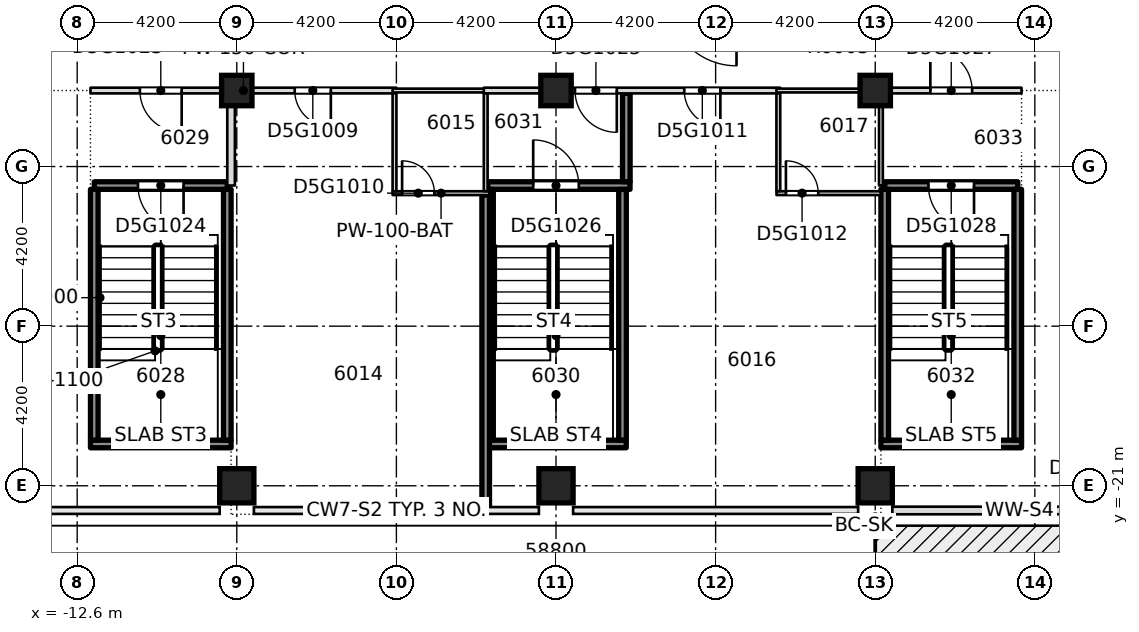
"""IFC4 building model, lengths in metres.
Left out: names, types, materials, properties, quantities, classifications, styles, units other than length and angle.
Written with IfcOpenShell. Run it as: python <this file> out.ifc"""

import sys

from ifc_helpers import new_model, si_unit, direction, frame, frame_2d, origin, origin_2d, place, context, subcontext, project, spatial, rectangle, extrude, element, fill, save


model = new_model("IFC4")
c1 = context("Model", 3, precision=1e-05, world=origin(), true_north=direction((0.0, 1.0)))
c2 = subcontext(c1, "Body", "Model", "MODEL_VIEW")
j1 = project(units=[si_unit("LENGTHUNIT", "METRE"), si_unit("PLANEANGLEUNIT", "RADIAN")], contexts=[c1])
p1 = place(None, origin())
s1 = spatial("IfcSite", under=j1, at=p1, CompositionType="ELEMENT")
p2 = place(p1, origin())
s2 = spatial("IfcBuilding", under=s1, at=p2, CompositionType="ELEMENT")
p3 = place(p2, frame((0.0, 0.0, 230.35)))
s3 = spatial("IfcBuildingStorey", under=s2, at=p3, CompositionType="ELEMENT", Elevation=230.35)
for number, where, z_axis, x_axis in (
    (1, (-8.4, -21.0, -0.4), (0.0, 0.0, 1.0), (1.0, 0.0, 0.0)),
    (2, (0.0, -21.0, -0.4), (0.0, 0.0, 1.0), (1.0, 0.0, 0.0)),
    (3, (8.4, -21.0, -0.4), (0.0, 0.0, 1.0), (1.0, 0.0, 0.0)),
):
    element("IfcColumn", number, at=place(p3, frame(where, z_axis=z_axis, x_axis=x_axis)), inside=s3, PredefinedType="COLUMN", context=c2, shape_type="SweptSolid", body=[
        extrude(rectangle(XDim=0.9, YDim=0.9, at=origin_2d()), origin(), (0.0, 0.0, 1.0), 3.45),
    ])
for number, where, z_axis, x_axis in (
    (4, (-8.4, -10.6, -0.4), (0.0, 0.0, 1.0), (1.0, 0.0, 0.0)),
    (5, (0.0, -10.6, -0.4), (0.0, 0.0, 1.0), (1.0, 0.0, 0.0)),
    (6, (8.4, -10.6, -0.4), (0.0, 0.0, 1.0), (1.0, 0.0, 0.0)),
):
    element("IfcColumn", number, at=place(p3, frame(where, z_axis=z_axis, x_axis=x_axis)), inside=s3, PredefinedType="COLUMN", context=c2, shape_type="SweptSolid", body=[
        extrude(rectangle(XDim=0.8, YDim=0.8, at=origin_2d()), origin(), (0.0, 0.0, 1.0), 3.45),
    ])
p4 = place(p3, frame((-1.848, -19.9, 0.0), z_axis=(0.0, 0.0, 1.0), x_axis=(1.0, 0.0, 0.0)))
e7 = element("IfcWall", 7, at=p4, inside=s3, PredefinedType="SOLIDWALL", context=c2, shape_type="SweptSolid", body=[
    extrude(rectangle(XDim=3.696, YDim=0.2, at=frame_2d((1.848, 0.0))), origin(), (0.0, 0.0, 1.0), 3.05),
])
p5 = place(p3, frame((-4.3, -13.3, 0.0), z_axis=(0.0, 0.0, 1.0), x_axis=(1.0, 0.0, 0.0)))
e8 = element("IfcWall", 8, at=p5, inside=s3, PredefinedType="PARTITIONING", context=c2, shape_type="SweptSolid", body=[
    extrude(rectangle(XDim=2.55, YDim=0.1, at=frame_2d((1.275, 0.0))), origin(), (0.0, 0.0, 1.0), 3.05),
])
p6 = place(p5, frame((0.25, 0.0, 0.0)))
e9 = element("IfcOpeningElement", 9, at=p6, cuts=e8, PredefinedType="OPENING", context=c2, shape_type="SweptSolid", body=[
    extrude(rectangle(XDim=0.85, YDim=2.1, at=frame_2d((0.425, 1.05))), frame((0.0, 0.06, 0.0), z_axis=(0.0, -1.0, 0.0), x_axis=(1.0, 0.0, 0.0)), (0.0, 0.0, 1.0), 0.12),
])
p7 = place(p3, frame((5.802, -13.3, 0.0), z_axis=(0.0, 0.0, 1.0), x_axis=(1.0, 0.0, 0.0)))
e10 = element("IfcWall", 10, at=p7, inside=s3, PredefinedType="PARTITIONING", context=c2, shape_type="SweptSolid", body=[
    extrude(rectangle(XDim=2.748, YDim=0.1, at=frame_2d((1.374, 0.0))), origin(), (0.0, 0.0, 1.0), 3.05),
])
p8 = place(p7, frame((0.248, 0.0, 0.0)))
e11 = element("IfcOpeningElement", 11, at=p8, cuts=e10, PredefinedType="OPENING", context=c2, shape_type="SweptSolid", body=[
    extrude(rectangle(XDim=0.85, YDim=2.1, at=frame_2d((0.425, 1.05))), frame((0.0, 0.06, 0.0), z_axis=(0.0, -1.0, 0.0), x_axis=(1.0, 0.0, 0.0)), (0.0, 0.0, 1.0), 0.12),
])
p9 = place(p3, frame((-12.15, -13.1, 0.0), z_axis=(0.0, 0.0, 1.0), x_axis=(1.0, 0.0, 0.0)))
e12 = element("IfcWall", 12, at=p9, inside=s3, PredefinedType="SOLIDWALL", context=c2, shape_type="SweptSolid", body=[
    extrude(rectangle(XDim=3.5, YDim=0.2, at=frame_2d((1.75, 0.0))), origin(), (0.0, 0.0, 1.0), 3.05),
])
p10 = place(p9, frame((1.15, 0.0, 0.0)))
e13 = element("IfcOpeningElement", 13, at=p10, cuts=e12, PredefinedType="OPENING", context=c2, shape_type="SweptSolid", body=[
    extrude(rectangle(XDim=1.2, YDim=2.1, at=frame_2d((0.6, 1.05))), frame((0.0, 0.11, 0.0), z_axis=(0.0, -1.0, 0.0), x_axis=(1.0, 0.0, 0.0)), (0.0, 0.0, 1.0), 0.22),
])
p11 = place(p3, frame((-1.798, -13.1, 0.0), z_axis=(0.0, 0.0, 1.0), x_axis=(1.0, 0.0, 0.0)))
e14 = element("IfcWall", 14, at=p11, inside=s3, PredefinedType="SOLIDWALL", context=c2, shape_type="SweptSolid", body=[
    extrude(rectangle(XDim=3.746, YDim=0.2, at=frame_2d((1.873, 0.0))), origin(), (0.0, 0.0, 1.0), 3.05),
])
p12 = place(p11, frame((1.198, 0.0, 0.0)))
e15 = element("IfcOpeningElement", 15, at=p12, cuts=e14, PredefinedType="OPENING", context=c2, shape_type="SweptSolid", body=[
    extrude(rectangle(XDim=1.2, YDim=2.1, at=frame_2d((0.6, 1.05))), frame((0.0, 0.11, 0.0), z_axis=(0.0, -1.0, 0.0), x_axis=(1.0, 0.0, 0.0)), (0.0, 0.0, 1.0), 0.22),
])
p13 = place(p3, frame((8.65, -13.1, 0.0), z_axis=(0.0, 0.0, 1.0), x_axis=(1.0, 0.0, 0.0)))
e16 = element("IfcWall", 16, at=p13, inside=s3, PredefinedType="SOLIDWALL", context=c2, shape_type="SweptSolid", body=[
    extrude(rectangle(XDim=3.5, YDim=0.2, at=frame_2d((1.75, 0.0))), origin(), (0.0, 0.0, 1.0), 3.05),
])
p14 = place(p13, frame((1.15, 0.0, 0.0)))
e17 = element("IfcOpeningElement", 17, at=p14, cuts=e16, PredefinedType="OPENING", context=c2, shape_type="SweptSolid", body=[
    extrude(rectangle(XDim=1.2, YDim=2.1, at=frame_2d((0.6, 1.05))), frame((0.0, 0.11, 0.0), z_axis=(0.0, -1.0, 0.0), x_axis=(1.0, 0.0, 0.0)), (0.0, 0.0, 1.0), 0.22),
])
p15 = place(p3, frame((-12.25, -10.6, 0.0), z_axis=(0.0, 0.0, 1.0), x_axis=(1.0, 0.0, 0.0)))
e18 = element("IfcWall", 18, at=p15, inside=s3, PredefinedType="PARTITIONING", context=c2, shape_type="SweptSolid", body=[
    extrude(rectangle(XDim=8.05, YDim=0.15, at=frame_2d((4.025, 0.0))), origin(), (0.0, 0.0, 1.0), 3.05),
])
p16 = place(p15, frame((5.375, 0.0, 0.0)))
e19 = element("IfcOpeningElement", 19, at=p16, cuts=e18, PredefinedType="OPENING", context=c2, shape_type="SweptSolid", body=[
    extrude(rectangle(XDim=0.95, YDim=2.1, at=frame_2d((0.475, 1.05))), frame((0.0, 0.085, 0.0), z_axis=(0.0, -1.0, 0.0), x_axis=(1.0, 0.0, 0.0)), (0.0, 0.0, 1.0), 0.17),
])
p17 = place(p15, frame((1.3, 0.0, 0.0)))
e20 = element("IfcOpeningElement", 20, at=p17, cuts=e18, PredefinedType="OPENING", context=c2, shape_type="SweptSolid", body=[
    extrude(rectangle(XDim=1.1, YDim=2.1, at=frame_2d((0.55, 1.05))), frame((0.0, 0.085, 0.0), z_axis=(0.0, -1.0, 0.0), x_axis=(1.0, 0.0, 0.0)), (0.0, 0.0, 1.0), 0.17),
])
p18 = place(p3, frame((-4.3, -10.6, 0.0), z_axis=(0.0, 0.0, 1.0), x_axis=(1.0, 0.0, 0.0)))
e21 = element("IfcWall", 21, at=p18, inside=s3, PredefinedType="PARTITIONING", context=c2, shape_type="SweptSolid", body=[
    extrude(rectangle(XDim=2.5, YDim=0.1, at=frame_2d((1.25, 0.0))), origin(), (0.0, 0.0, 1.0), 3.05),
])
p19 = place(p3, frame((-1.9, -10.6, 0.0), z_axis=(0.0, 0.0, 1.0), x_axis=(1.0, 0.0, 0.0)))
e22 = element("IfcWall", 22, at=p19, inside=s3, PredefinedType="PARTITIONING", context=c2, shape_type="SweptSolid", body=[
    extrude(rectangle(XDim=7.8, YDim=0.15, at=frame_2d((3.9, 0.0))), origin(), (0.0, 0.0, 1.0), 3.05),
])
p20 = place(p19, frame((5.275, 0.0, 0.0)))
e23 = element("IfcOpeningElement", 23, at=p20, cuts=e22, PredefinedType="OPENING", context=c2, shape_type="SweptSolid", body=[
    extrude(rectangle(XDim=0.95, YDim=2.1, at=frame_2d((0.475, 1.05))), frame((0.0, 0.085, 0.0), z_axis=(0.0, -1.0, 0.0), x_axis=(1.0, 0.0, 0.0)), (0.0, 0.0, 1.0), 0.17),
])
p21 = place(p19, frame((2.4, 0.0, 0.0)))
e24 = element("IfcOpeningElement", 24, at=p21, cuts=e22, PredefinedType="OPENING", context=c2, shape_type="SweptSolid", body=[
    extrude(rectangle(XDim=1.1, YDim=2.1, at=frame_2d((0.55, 1.05))), frame((0.0, 0.085, 0.0), z_axis=(0.0, -1.0, 0.0), x_axis=(1.0, 0.0, 0.0)), (0.0, 0.0, 1.0), 0.17),
])
p22 = place(p3, frame((5.8, -10.6, 0.0), z_axis=(0.0, 0.0, 1.0), x_axis=(1.0, 0.0, 0.0)))
e25 = element("IfcWall", 25, at=p22, inside=s3, PredefinedType="PARTITIONING", context=c2, shape_type="SweptSolid", body=[
    extrude(rectangle(XDim=2.8, YDim=0.1, at=frame_2d((1.4, 0.0))), origin(), (0.0, 0.0, 1.0), 3.05),
])
p23 = place(p3, frame((8.5, -10.6, 0.0), z_axis=(0.0, 0.0, 1.0), x_axis=(1.0, 0.0, 0.0)))
e26 = element("IfcWall", 26, at=p23, inside=s3, PredefinedType="PARTITIONING", context=c2, shape_type="SweptSolid", body=[
    extrude(rectangle(XDim=3.75, YDim=0.15, at=frame_2d((1.875, 0.0))), origin(), (0.0, 0.0, 1.0), 3.05),
])
p24 = place(p23, frame((1.35, 0.0, 0.0)))
e27 = element("IfcOpeningElement", 27, at=p24, cuts=e26, PredefinedType="OPENING", context=c2, shape_type="SweptSolid", body=[
    extrude(rectangle(XDim=1.1, YDim=2.1, at=frame_2d((0.55, 1.05))), frame((0.0, 0.085, 0.0), z_axis=(0.0, -1.0, 0.0), x_axis=(1.0, 0.0, 0.0)), (0.0, 0.0, 1.0), 0.17),
])
p25 = place(p3, frame((-8.55, -13.1, 0.0), z_axis=(0.0, 0.0, 1.0), x_axis=(0.0, 1.0, 0.0)))
e28 = element("IfcWall", 28, at=p25, inside=s3, PredefinedType="PARTITIONING", context=c2, shape_type="SweptSolid", body=[
    extrude(rectangle(XDim=2.425, YDim=0.2, at=frame_2d((1.212, 0.0))), origin(), (0.0, 0.0, 1.0), 3.05),
])
for number, where, z_axis, x_axis in (
    (29, (-4.25, -13.25, 0.0), (0.0, 0.0, 1.0), (0.0, 1.0, 0.0)),
    (30, (-1.85, -13.25, 0.0), (0.0, 0.0, 1.0), (0.0, 1.0, 0.0)),
):
    element("IfcWall", number, at=place(p3, frame(where, z_axis=z_axis, x_axis=x_axis)), inside=s3, PredefinedType="PARTITIONING", context=c2, shape_type="SweptSolid", body=[
        extrude(rectangle(XDim=2.575, YDim=0.1, at=frame_2d((1.288, 0.0))), origin(), (0.0, 0.0, 1.0), 3.05),
    ])
for number, where, z_axis, x_axis in (
    (31, (-1.75, -19.798, 0.0), (0.0, 0.0, 1.0), (0.0, 1.0, 0.0)),
    (32, (1.75, -19.798, 0.0), (0.0, 0.0, 1.0), (0.0, 1.0, 0.0)),
):
    element("IfcWall", number, at=place(p3, frame(where, z_axis=z_axis, x_axis=x_axis)), inside=s3, PredefinedType="SOLIDWALL", context=c2, shape_type="SweptSolid", body=[
        extrude(rectangle(XDim=6.596, YDim=0.2, at=frame_2d((3.298, 0.0))), origin(), (0.0, 0.0, 1.0), 3.05),
    ])
p26 = place(p3, frame((1.85, -12.998, 0.0), z_axis=(0.0, 0.0, 1.0), x_axis=(0.0, 1.0, 0.0)))
e33 = element("IfcWall", 33, at=p26, inside=s3, PredefinedType="SOLIDWALL", context=c2, shape_type="SweptSolid", body=[
    extrude(rectangle(XDim=2.323, YDim=0.2, at=frame_2d((1.162, 0.0))), origin(), (0.0, 0.0, 1.0), 3.05),
])
p27 = place(p3, frame((5.85, -13.248, 0.0), z_axis=(0.0, 0.0, 1.0), x_axis=(0.0, 1.0, 0.0)))
e34 = element("IfcWall", 34, at=p27, inside=s3, PredefinedType="PARTITIONING", context=c2, shape_type="SweptSolid", body=[
    extrude(rectangle(XDim=2.573, YDim=0.1, at=frame_2d((1.287, 0.0))), origin(), (0.0, 0.0, 1.0), 3.05),
])
p28 = place(p3, frame((8.55, -13.1, 0.0), z_axis=(0.0, 0.0, 1.0), x_axis=(0.0, 1.0, 0.0)))
e35 = element("IfcWall", 35, at=p28, inside=s3, PredefinedType="PARTITIONING", context=c2, shape_type="SweptSolid", body=[
    extrude(rectangle(XDim=2.425, YDim=0.1, at=frame_2d((1.212, 0.0))), origin(), (0.0, 0.0, 1.0), 3.05),
])
p29 = place(p3, frame((8.85, -21.65, 0.0), z_axis=(0.0, 0.0, 1.0), x_axis=(1.0, 0.0, 0.0)))
e36 = element("IfcWall", 36, at=p29, inside=s3, PredefinedType="STANDARD", context=c2, shape_type="SweptSolid", body=[
    extrude(rectangle(XDim=6.7, YDim=0.2, at=frame_2d((3.35, 0.0))), origin(), (0.0, 0.0, 1.0), 3.05),
])
p30 = place(p29, frame((4.725, 0.0, 0.0)))
e37 = element("IfcOpeningElement", 37, at=p30, cuts=e36, PredefinedType="OPENING", context=c2, shape_type="SweptSolid", body=[
    extrude(rectangle(XDim=1.0, YDim=2.4, at=frame_2d((0.5, 1.2))), frame((0.0, 0.11, 0.0), z_axis=(0.0, -1.0, 0.0), x_axis=(1.0, 0.0, 0.0)), (0.0, 0.0, 1.0), 0.22),
])
p31 = place(p3, frame((-12.25, -19.9, 0.0), z_axis=(0.0, 0.0, 1.0), x_axis=(1.0, 0.0, 0.0)))
e38 = element("IfcWall", 38, at=p31, inside=s3, PredefinedType="SOLIDWALL", context=c2, shape_type="SweptSolid", body=[
    extrude(rectangle(XDim=3.7, YDim=0.2, at=frame_2d((1.85, 0.0))), origin(), (0.0, 0.0, 1.0), 3.05),
])
for number, where, z_axis, x_axis in (
    (39, (-12.15, -19.8, 0.0), (0.0, 0.0, 1.0), (0.0, 1.0, 0.0)),
    (40, (-8.65, -19.8, 0.0), (0.0, 0.0, 1.0), (0.0, 1.0, 0.0)),
):
    element("IfcWall", number, at=place(p3, frame(where, z_axis=z_axis, x_axis=x_axis)), inside=s3, PredefinedType="SOLIDWALL", context=c2, shape_type="SweptSolid", body=[
        extrude(rectangle(XDim=6.6, YDim=0.2, at=frame_2d((3.3, 0.0))), origin(), (0.0, 0.0, 1.0), 3.05),
    ])
p32 = place(p3, frame((8.55, -19.9, 0.0), z_axis=(0.0, 0.0, 1.0), x_axis=(1.0, 0.0, 0.0)))
e41 = element("IfcWall", 41, at=p32, inside=s3, PredefinedType="SOLIDWALL", context=c2, shape_type="SweptSolid", body=[
    extrude(rectangle(XDim=3.7, YDim=0.2, at=frame_2d((1.85, 0.0))), origin(), (0.0, 0.0, 1.0), 3.05),
])
for number, where, z_axis, x_axis in (
    (42, (8.65, -19.8, 0.0), (0.0, 0.0, 1.0), (0.0, 1.0, 0.0)),
    (43, (12.15, -19.8, 0.0), (0.0, 0.0, 1.0), (0.0, 1.0, 0.0)),
):
    element("IfcWall", number, at=place(p3, frame(where, z_axis=z_axis, x_axis=x_axis)), inside=s3, PredefinedType="SOLIDWALL", context=c2, shape_type="SweptSolid", body=[
        extrude(rectangle(XDim=6.6, YDim=0.2, at=frame_2d((3.3, 0.0))), origin(), (0.0, 0.0, 1.0), 3.05),
    ])
p33 = place(p3, frame((-1.85, -21.55, 0.0), z_axis=(0.0, 0.0, 1.0), x_axis=(0.0, 1.0, 0.0)))
e44 = element("IfcWall", 44, at=p33, inside=s3, PredefinedType="SOLIDWALL", context=c2, shape_type="SweptSolid", body=[
    extrude(rectangle(XDim=8.2, YDim=0.2, at=frame_2d((4.1, 0.0))), origin(), (0.0, 0.0, 1.0), 3.05),
])
p34 = place(p16, origin())
e45 = element("IfcDoor", 45, at=p34, inside=s3, OperationType="SINGLE_SWING_LEFT", PredefinedType="DOOR", context=c2, shape_type="SweptSolid", body=[
    extrude(rectangle(XDim=0.95, YDim=2.1, at=frame_2d((0.475, 1.05))), frame((0.0, 0.025, 0.0), z_axis=(0.0, -1.0, 0.0), x_axis=(1.0, 0.0, 0.0)), (0.0, 0.0, 1.0), 0.05),
])
fill(e19, e45)
p35 = place(p6, origin())
e46 = element("IfcDoor", 46, at=p35, inside=s3, OperationType="SINGLE_SWING_LEFT", PredefinedType="DOOR", context=c2, shape_type="SweptSolid", body=[
    extrude(rectangle(XDim=0.85, YDim=2.1, at=frame_2d((0.425, 1.05))), frame((0.0, 0.025, 0.0), z_axis=(0.0, -1.0, 0.0), x_axis=(1.0, 0.0, 0.0)), (0.0, 0.0, 1.0), 0.05),
])
fill(e9, e46)
p36 = place(p20, origin())
e47 = element("IfcDoor", 47, at=p36, inside=s3, OperationType="SINGLE_SWING_LEFT", PredefinedType="DOOR", context=c2, shape_type="SweptSolid", body=[
    extrude(rectangle(XDim=0.95, YDim=2.1, at=frame_2d((0.475, 1.05))), frame((0.0, 0.025, 0.0), z_axis=(0.0, -1.0, 0.0), x_axis=(1.0, 0.0, 0.0)), (0.0, 0.0, 1.0), 0.05),
])
fill(e23, e47)
p37 = place(p8, origin())
e48 = element("IfcDoor", 48, at=p37, inside=s3, OperationType="SINGLE_SWING_LEFT", PredefinedType="DOOR", context=c2, shape_type="SweptSolid", body=[
    extrude(rectangle(XDim=0.85, YDim=2.1, at=frame_2d((0.425, 1.05))), frame((0.0, 0.025, 0.0), z_axis=(0.0, -1.0, 0.0), x_axis=(1.0, 0.0, 0.0)), (0.0, 0.0, 1.0), 0.05),
])
fill(e11, e48)
p38 = place(p17, origin())
e49 = element("IfcDoor", 49, at=p38, inside=s3, OperationType="SINGLE_SWING_RIGHT", PredefinedType="DOOR", context=c2, shape_type="SweptSolid", body=[
    extrude(rectangle(XDim=1.1, YDim=2.1, at=frame_2d((0.55, 1.05))), frame((0.0, 0.025, 0.0), z_axis=(0.0, -1.0, 0.0), x_axis=(1.0, 0.0, 0.0)), (0.0, 0.0, 1.0), 0.05),
])
fill(e20, e49)
p39 = place(p10, origin())
e50 = element("IfcDoor", 50, at=p39, inside=s3, OperationType="SINGLE_SWING_RIGHT", PredefinedType="DOOR", context=c2, shape_type="SweptSolid", body=[
    extrude(rectangle(XDim=1.2, YDim=2.1, at=frame_2d((0.6, 1.05))), frame((0.0, 0.025, 0.0), z_axis=(0.0, -1.0, 0.0), x_axis=(1.0, 0.0, 0.0)), (0.0, 0.0, 1.0), 0.05),
])
fill(e13, e50)
p40 = place(p21, origin())
e51 = element("IfcDoor", 51, at=p40, inside=s3, OperationType="SINGLE_SWING_LEFT", PredefinedType="DOOR", context=c2, shape_type="SweptSolid", body=[
    extrude(rectangle(XDim=1.1, YDim=2.1, at=frame_2d((0.55, 1.05))), frame((0.0, 0.025, 0.0), z_axis=(0.0, -1.0, 0.0), x_axis=(1.0, 0.0, 0.0)), (0.0, 0.0, 1.0), 0.05),
])
fill(e24, e51)
p41 = place(p12, origin())
e52 = element("IfcDoor", 52, at=p41, inside=s3, OperationType="SINGLE_SWING_RIGHT", PredefinedType="DOOR", context=c2, shape_type="SweptSolid", body=[
    extrude(rectangle(XDim=1.2, YDim=2.1, at=frame_2d((0.6, 1.05))), frame((0.0, 0.025, 0.0), z_axis=(0.0, -1.0, 0.0), x_axis=(1.0, 0.0, 0.0)), (0.0, 0.0, 1.0), 0.05),
])
fill(e15, e52)
p42 = place(p24, origin())
e53 = element("IfcDoor", 53, at=p42, inside=s3, OperationType="SINGLE_SWING_RIGHT", PredefinedType="DOOR", context=c2, shape_type="SweptSolid", body=[
    extrude(rectangle(XDim=1.1, YDim=2.1, at=frame_2d((0.55, 1.05))), frame((0.0, 0.025, 0.0), z_axis=(0.0, -1.0, 0.0), x_axis=(1.0, 0.0, 0.0)), (0.0, 0.0, 1.0), 0.05),
])
fill(e27, e53)
p43 = place(p14, origin())
e54 = element("IfcDoor", 54, at=p43, inside=s3, OperationType="SINGLE_SWING_RIGHT", PredefinedType="DOOR", context=c2, shape_type="SweptSolid", body=[
    extrude(rectangle(XDim=1.2, YDim=2.1, at=frame_2d((0.6, 1.05))), frame((0.0, 0.025, 0.0), z_axis=(0.0, -1.0, 0.0), x_axis=(1.0, 0.0, 0.0)), (0.0, 0.0, 1.0), 0.05),
])
fill(e17, e54)
save(model, sys.argv[1])
